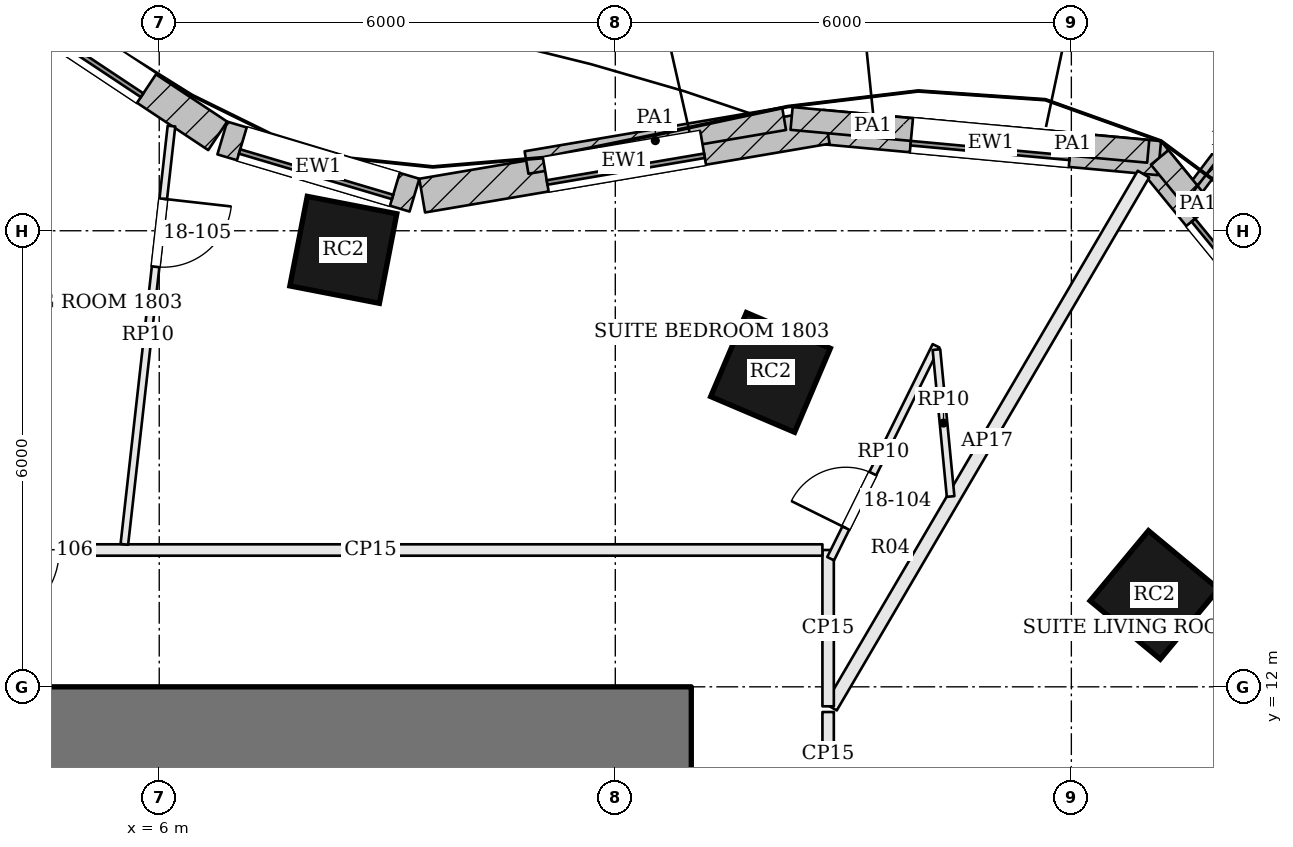
"""IFC4 building model, lengths in metres.
Left out: names, types, materials, properties, quantities, classifications, styles, units other than length and angle.
Written with IfcOpenShell. Run it as: python <this file> out.ifc"""

import sys

from ifc_helpers import new_model, si_unit, direction, frame, frame_2d, origin, origin_2d, place, context, subcontext, project, spatial, rectangle, extrude, element, fill, save


model = new_model("IFC4")
c1 = context("Model", 3, precision=1e-05, world=origin(), true_north=direction((0.0, 1.0)))
c2 = subcontext(c1, "Body", "Model", "MODEL_VIEW")
j1 = project(units=[si_unit("LENGTHUNIT", "METRE"), si_unit("PLANEANGLEUNIT", "RADIAN")], contexts=[c1])
p1 = place(None, origin())
s1 = spatial("IfcSite", under=j1, at=p1, CompositionType="ELEMENT")
p2 = place(p1, origin())
s2 = spatial("IfcBuilding", under=s1, at=p2, CompositionType="ELEMENT")
p3 = place(p2, frame((0.0, 0.0, 81.6)))
s3 = spatial("IfcBuildingStorey", under=s2, at=p3, CompositionType="ELEMENT", Elevation=81.6)
p4 = place(p3, frame((-13.0, 11.45, 0.0), z_axis=(0.0, 0.0, 1.0), x_axis=(1.0, 0.0, 0.0)))
e1 = element("IfcWall", 1, at=p4, inside=s3, PredefinedType="SHEAR", context=c2, shape_type="SweptSolid", body=[
    extrude(rectangle(XDim=26.0, YDim=1.1, at=frame_2d((13.0, 0.0))), origin(), (0.0, 0.0, 1.0), 3.6),
])
p5 = place(p4, frame((8.825, 0.0, 0.0)))
e2 = element("IfcOpeningElement", 2, at=p5, cuts=e1, PredefinedType="OPENING", context=c2, shape_type="SweptSolid", body=[
    extrude(rectangle(XDim=1.0, YDim=2.1, at=frame_2d((0.5, 1.05))), frame((0.0, 0.56, 0.0), z_axis=(0.0, -1.0, 0.0), x_axis=(1.0, 0.0, 0.0)), (0.0, 0.0, 1.0), 1.12),
])
p6 = place(p4, frame((11.275, 0.0, 0.0)))
e3 = element("IfcOpeningElement", 3, at=p6, cuts=e1, PredefinedType="OPENING", context=c2, shape_type="SweptSolid", body=[
    extrude(rectangle(XDim=1.0, YDim=2.1, at=frame_2d((0.5, 1.05))), frame((0.0, 0.56, 0.0), z_axis=(0.0, -1.0, 0.0), x_axis=(1.0, 0.0, 0.0)), (0.0, 0.0, 1.0), 1.12),
])
p7 = place(p4, frame((14.125, 0.0, 0.0)))
e4 = element("IfcOpeningElement", 4, at=p7, cuts=e1, PredefinedType="OPENING", context=c2, shape_type="SweptSolid", body=[
    extrude(rectangle(XDim=1.0, YDim=2.1, at=frame_2d((0.5, 1.05))), frame((0.0, 0.56, 0.0), z_axis=(0.0, -1.0, 0.0), x_axis=(1.0, 0.0, 0.0)), (0.0, 0.0, 1.0), 1.12),
])
p8 = place(p4, frame((16.725, 0.0, 0.0)))
e5 = element("IfcOpeningElement", 5, at=p8, cuts=e1, PredefinedType="OPENING", context=c2, shape_type="SweptSolid", body=[
    extrude(rectangle(XDim=0.7, YDim=2.1, at=frame_2d((0.35, 1.05))), frame((0.0, 0.56, 0.0), z_axis=(0.0, -1.0, 0.0), x_axis=(1.0, 0.0, 0.0)), (0.0, 0.0, 1.0), 1.12),
])
for number, where, z_axis, x_axis in (
    (6, (19.092, 13.209, -0.7), (0.0, 0.0, 1.0), (-0.769, 0.639, 0.0)),
    (7, (14.042, 16.136, -0.7), (0.0, 0.0, 1.0), (-0.92, 0.392, 0.0)),
    (8, (8.422, 17.749, -0.7), (0.0, 0.0, 1.0), (-0.982, 0.191, 0.0)),
):
    element("IfcColumn", number, at=place(p3, frame(where, z_axis=z_axis, x_axis=x_axis)), inside=s3, PredefinedType="COLUMN", context=c2, shape_type="SweptSolid", body=[
        extrude(rectangle(XDim=1.2, YDim=1.2, at=origin_2d()), origin(), (0.0, 0.0, 1.0), 4.3),
    ])
p9 = place(p3, frame((21.696, 15.748, 0.0), z_axis=(0.0, 0.0, 1.0), x_axis=(-0.632968710519, 0.774177377288, 0.0)))
e9 = element("IfcWall", 9, at=p9, inside=s3, PredefinedType="SOLIDWALL", context=c2, shape_type="SweptSolid", body=[
    extrude(rectangle(XDim=4.25, YDim=0.45, at=frame_2d((2.125, 0.0))), origin(), (0.0, 0.0, 1.0), 3.4),
])
p10 = place(p9, frame((1.075, 0.0, 0.9)))
e10 = element("IfcOpeningElement", 10, at=p10, cuts=e9, PredefinedType="OPENING", context=c2, shape_type="SweptSolid", body=[
    extrude(rectangle(XDim=2.1, YDim=2.0, at=frame_2d((1.05, 1.0))), frame((0.0, 0.235, 0.0), z_axis=(0.0, -1.0, 0.0), x_axis=(1.0, 0.0, 0.0)), (0.0, 0.0, 1.0), 0.47),
])
p11 = place(p3, frame((19.159, 18.956, 0.0), z_axis=(0.0, 0.0, 1.0), x_axis=(-0.995777399421, 0.091800712424, 0.0)))
e11 = element("IfcWall", 11, at=p11, inside=s3, PredefinedType="SOLIDWALL", context=c2, shape_type="SweptSolid", body=[
    extrude(rectangle(XDim=4.455, YDim=0.45, at=frame_2d((2.227, 0.0))), origin(), (0.0, 0.0, 1.0), 3.4),
])
p12 = place(p11, frame((1.177, 0.0, 0.9)))
e12 = element("IfcOpeningElement", 12, at=p12, cuts=e11, PredefinedType="OPENING", context=c2, shape_type="SweptSolid", body=[
    extrude(rectangle(XDim=2.1, YDim=2.0, at=frame_2d((1.05, 1.0))), frame((0.0, 0.235, 0.0), z_axis=(0.0, -1.0, 0.0), x_axis=(1.0, 0.0, 0.0)), (0.0, 0.0, 1.0), 0.47),
])
p13 = place(p3, frame((14.782, 19.367, 0.0), z_axis=(0.0, 0.0, 1.0), x_axis=(-0.98585584667, -0.167595493934, 0.0)))
e13 = element("IfcWall", 13, at=p13, inside=s3, PredefinedType="SOLIDWALL", context=c2, shape_type="SweptSolid", body=[
    extrude(rectangle(XDim=5.399, YDim=0.45, at=frame_2d((2.699, 0.0))), origin(), (0.0, 0.0, 1.0), 3.4),
])
p14 = place(p13, frame((1.649, 0.0, 0.9)))
e14 = element("IfcOpeningElement", 14, at=p14, cuts=e13, PredefinedType="OPENING", context=c2, shape_type="SweptSolid", body=[
    extrude(rectangle(XDim=2.1, YDim=2.0, at=frame_2d((1.05, 1.0))), frame((0.0, 0.235, 0.0), z_axis=(0.0, -1.0, 0.0), x_axis=(1.0, 0.0, 0.0)), (0.0, 0.0, 1.0), 0.47),
])
p15 = place(p3, frame((9.357, 18.469, 0.0), z_axis=(0.0, 0.0, 1.0), x_axis=(-0.958524054629, 0.285011643091, 0.0)))
e15 = element("IfcWall", 15, at=p15, inside=s3, PredefinedType="SOLIDWALL", context=c2, shape_type="SweptSolid", body=[
    extrude(rectangle(XDim=2.637, YDim=0.45, at=frame_2d((1.319, 0.0))), origin(), (0.0, 0.0, 1.0), 3.4),
])
p16 = place(p15, frame((0.269, 0.0, 0.9)))
e16 = element("IfcOpeningElement", 16, at=p16, cuts=e15, PredefinedType="OPENING", context=c2, shape_type="SweptSolid", body=[
    extrude(rectangle(XDim=2.1, YDim=2.0, at=frame_2d((1.05, 1.0))), frame((0.0, 0.235, 0.0), z_axis=(0.0, -1.0, 0.0), x_axis=(1.0, 0.0, 0.0)), (0.0, 0.0, 1.0), 0.47),
])
p17 = place(p3, frame((6.769, 19.248, 0.0), z_axis=(0.0, 0.0, 1.0), x_axis=(-0.832973379274, 0.553313066375, 0.0)))
e17 = element("IfcWall", 17, at=p17, inside=s3, PredefinedType="SOLIDWALL", context=c2, shape_type="SweptSolid", body=[
    extrude(rectangle(XDim=4.348, YDim=0.45, at=frame_2d((2.174, 0.0))), origin(), (0.0, 0.0, 1.0), 3.4),
])
p18 = place(p17, frame((1.124, 0.0, 0.9)))
e18 = element("IfcOpeningElement", 18, at=p18, cuts=e17, PredefinedType="OPENING", context=c2, shape_type="SweptSolid", body=[
    extrude(rectangle(XDim=2.1, YDim=2.0, at=frame_2d((1.05, 1.0))), frame((0.0, 0.235, 0.0), z_axis=(0.0, -1.0, 0.0), x_axis=(1.0, 0.0, 0.0)), (0.0, 0.0, 1.0), 0.47),
])
p19 = place(p3, frame((19.591, 18.498, 0.0), z_axis=(0.0, 0.0, 1.0), x_axis=(0.603387525063, 0.797448114048, 0.0)))
e19 = element("IfcWall", 19, at=p19, inside=s3, PredefinedType="SOLIDWALL", context=c2, shape_type="SweptSolid", body=[
    extrude(rectangle(XDim=1.75, YDim=0.2, at=frame_2d((0.875, 0.0))), origin(), (0.0, 0.0, 1.0), 3.4),
])
p20 = place(p3, frame((20.168, 17.734, 3.6), z_axis=(0.0, 0.0, 1.0), x_axis=(-0.632995189145, 0.774155727564, 0.0)))
e20 = element("IfcWall", 20, at=p20, inside=s3, PredefinedType="PARAPET", context=c2, shape_type="SweptSolid", body=[
    extrude(rectangle(XDim=1.589, YDim=0.3, at=frame_2d((0.795, 0.0))), origin(), (0.0, 0.0, 1.0), 1.1),
])
p21 = place(p3, frame((19.011, 19.045, 3.6), z_axis=(0.0, 0.0, 1.0), x_axis=(-0.995779953678, 0.09177300176, 0.0)))
e21 = element("IfcWall", 21, at=p21, inside=s3, PredefinedType="PARAPET", context=c2, shape_type="SweptSolid", body=[
    extrude(rectangle(XDim=1.992, YDim=0.3, at=frame_2d((0.996, 0.0))), origin(), (0.0, 0.0, 1.0), 1.1),
])
p22 = place(p3, frame((16.462, 19.28, 3.6), z_axis=(0.0, 0.0, 1.0), x_axis=(-0.995778015376, 0.091794030816, 0.0)))
e22 = element("IfcWall", 22, at=p22, inside=s3, PredefinedType="PARAPET", context=c2, shape_type="SweptSolid", body=[
    extrude(rectangle(XDim=2.152, YDim=0.3, at=frame_2d((1.076, 0.0))), origin(), (0.0, 0.0, 1.0), 1.1),
])
p23 = place(p3, frame((14.221, 19.473, 3.6), z_axis=(0.0, 0.0, 1.0), x_axis=(-0.985864880964, -0.167542342353, 0.0)))
e23 = element("IfcWall", 23, at=p23, inside=s3, PredefinedType="PARAPET", context=c2, shape_type="SweptSolid", body=[
    extrude(rectangle(XDim=3.438, YDim=0.3, at=frame_2d((1.719, 0.0))), origin(), (0.0, 0.0, 1.0), 1.1),
])
p24 = place(p3, frame((14.8, 10.572, 0.0), z_axis=(0.0, 0.0, 1.0), x_axis=(0.0, 1.0, 0.0)))
e24 = element("IfcWall", 24, at=p24, inside=s3, PredefinedType="PARTITIONING", context=c2, shape_type="SweptSolid", body=[
    extrude(rectangle(XDim=1.097, YDim=0.15, at=frame_2d((0.548, 0.0))), origin(), (0.0, 0.0, 1.0), 2.784),
])
p25 = place(p3, frame((18.949, 18.745, 0.0), z_axis=(0.0, 0.0, 1.0), x_axis=(-0.505754187447, -0.862677634972, 0.0)))
e25 = element("IfcWall", 25, at=p25, inside=s3, PredefinedType="PARTITIONING", context=c2, shape_type="SweptSolid", body=[
    extrude(rectangle(XDim=8.128, YDim=0.175, at=frame_2d((4.064, 0.0))), origin(), (0.0, 0.0, 1.0), 2.784),
])
p26 = place(p3, frame((14.8, 11.744, 0.0), z_axis=(0.0, 0.0, 1.0), x_axis=(0.0, 1.0, 0.0)))
e26 = element("IfcWall", 26, at=p26, inside=s3, PredefinedType="PARTITIONING", context=c2, shape_type="SweptSolid", body=[
    extrude(rectangle(XDim=2.056, YDim=0.15, at=frame_2d((1.028, 0.0))), origin(), (0.0, 0.0, 1.0), 2.784),
])
p27 = place(p3, frame((14.725, 13.8, 0.0), z_axis=(0.0, 0.0, 1.0), x_axis=(-1.0, 0.0, 0.0)))
e27 = element("IfcWall", 27, at=p27, inside=s3, PredefinedType="PARTITIONING", context=c2, shape_type="SweptSolid", body=[
    extrude(rectangle(XDim=11.889, YDim=0.15, at=frame_2d((5.945, 0.0))), origin(), (0.0, 0.0, 1.0), 2.784),
])
p28 = place(p27, frame((10.041, 0.0, 0.0)))
e28 = element("IfcOpeningElement", 28, at=p28, cuts=e27, PredefinedType="OPENING", context=c2, shape_type="SweptSolid", body=[
    extrude(rectangle(XDim=1.0, YDim=2.1, at=frame_2d((0.5, 1.05))), frame((0.0, 0.085, 0.0), z_axis=(0.0, -1.0, 0.0), x_axis=(1.0, 0.0, 0.0)), (0.0, 0.0, 1.0), 0.17),
])
p29 = place(p3, frame((22.414, 11.576, 0.0), z_axis=(0.0, 0.0, 1.0), x_axis=(-0.77113161257, -0.636675769992, 0.0)))
e29 = element("IfcWall", 29, at=p29, inside=s3, PredefinedType="PARTITIONING", context=c2, shape_type="SweptSolid", body=[
    extrude(rectangle(XDim=5.89, YDim=0.1, at=frame_2d((2.945, 0.0))), origin(), (0.0, 0.0, 1.0), 2.784),
])
p30 = place(p29, frame((1.815, 0.0, 0.0)))
e30 = element("IfcOpeningElement", 30, at=p30, cuts=e29, PredefinedType="OPENING", context=c2, shape_type="SweptSolid", body=[
    extrude(rectangle(XDim=0.9, YDim=2.4, at=frame_2d((0.45, 1.2))), frame((0.0, 0.06, 0.0), z_axis=(0.0, -1.0, 0.0), x_axis=(1.0, 0.0, 0.0)), (0.0, 0.0, 1.0), 0.12),
])
p31 = place(p3, frame((6.161, 19.377, 0.0), z_axis=(0.0, 0.0, 1.0), x_axis=(-0.11193626313, -0.993715388326, 0.0)))
e31 = element("IfcWall", 31, at=p31, inside=s3, PredefinedType="PARTITIONING", context=c2, shape_type="SweptSolid", body=[
    extrude(rectangle(XDim=5.538, YDim=0.1, at=frame_2d((2.769, 0.0))), origin(), (0.0, 0.0, 1.0), 2.784),
])
p32 = place(p31, frame((0.963, 0.0, 0.0)))
e32 = element("IfcOpeningElement", 32, at=p32, cuts=e31, PredefinedType="OPENING", context=c2, shape_type="SweptSolid", body=[
    extrude(rectangle(XDim=0.9, YDim=2.4, at=frame_2d((0.45, 1.2))), frame((0.0, 0.06, 0.0), z_axis=(0.0, -1.0, 0.0), x_axis=(1.0, 0.0, 0.0)), (0.0, 0.0, 1.0), 0.12),
])
p33 = place(p3, frame((14.833, 13.686, 0.0), z_axis=(0.0, 0.0, 1.0), x_axis=(0.443835356617, 0.896108350712, 0.0)))
e33 = element("IfcWall", 33, at=p33, inside=s3, PredefinedType="PARTITIONING", context=c2, shape_type="SweptSolid", body=[
    extrude(rectangle(XDim=3.125, YDim=0.1, at=frame_2d((1.562, 0.0))), origin(), (0.0, 0.0, 1.0), 2.784),
])
p34 = place(p33, frame((0.45, 0.0, 0.0)))
e34 = element("IfcOpeningElement", 34, at=p34, cuts=e33, PredefinedType="OPENING", context=c2, shape_type="SweptSolid", body=[
    extrude(rectangle(XDim=0.8, YDim=2.1, at=frame_2d((0.4, 1.05))), frame((0.0, 0.06, 0.0), z_axis=(0.0, -1.0, 0.0), x_axis=(1.0, 0.0, 0.0)), (0.0, 0.0, 1.0), 0.12),
])
p35 = place(p3, frame((16.225, 16.436, 0.0), z_axis=(0.0, 0.0, 1.0), x_axis=(0.095954429619, -0.995385727965, 0.0)))
e35 = element("IfcWall", 35, at=p35, inside=s3, PredefinedType="PARTITIONING", context=c2, shape_type="SweptSolid", body=[
    extrude(rectangle(XDim=1.941, YDim=0.1, at=frame_2d((0.971, 0.0))), origin(), (0.0, 0.0, 1.0), 2.784),
])
p36 = place(p10, origin())
e36 = element("IfcWindow", 36, at=p36, inside=s3, PartitioningType="SINGLE_PANEL", PredefinedType="WINDOW", context=c2, shape_type="SweptSolid", body=[
    extrude(rectangle(XDim=2.1, YDim=2.0, at=frame_2d((1.05, 1.0))), frame((0.0, 0.135, 0.0), z_axis=(0.0, -1.0, 0.0), x_axis=(1.0, 0.0, 0.0)), (0.0, 0.0, 1.0), 0.06),
])
fill(e10, e36)
p37 = place(p12, origin())
e37 = element("IfcWindow", 37, at=p37, inside=s3, PartitioningType="SINGLE_PANEL", PredefinedType="WINDOW", context=c2, shape_type="SweptSolid", body=[
    extrude(rectangle(XDim=2.1, YDim=2.0, at=frame_2d((1.05, 1.0))), frame((0.0, 0.135, 0.0), z_axis=(0.0, -1.0, 0.0), x_axis=(1.0, 0.0, 0.0)), (0.0, 0.0, 1.0), 0.06),
])
fill(e12, e37)
p38 = place(p14, origin())
e38 = element("IfcWindow", 38, at=p38, inside=s3, PartitioningType="SINGLE_PANEL", PredefinedType="WINDOW", context=c2, shape_type="SweptSolid", body=[
    extrude(rectangle(XDim=2.1, YDim=2.0, at=frame_2d((1.05, 1.0))), frame((0.0, 0.135, 0.0), z_axis=(0.0, -1.0, 0.0), x_axis=(1.0, 0.0, 0.0)), (0.0, 0.0, 1.0), 0.06),
])
fill(e14, e38)
p39 = place(p16, origin())
e39 = element("IfcWindow", 39, at=p39, inside=s3, PartitioningType="SINGLE_PANEL", PredefinedType="WINDOW", context=c2, shape_type="SweptSolid", body=[
    extrude(rectangle(XDim=2.1, YDim=2.0, at=frame_2d((1.05, 1.0))), frame((0.0, 0.135, 0.0), z_axis=(0.0, -1.0, 0.0), x_axis=(1.0, 0.0, 0.0)), (0.0, 0.0, 1.0), 0.06),
])
fill(e16, e39)
p40 = place(p18, origin())
e40 = element("IfcWindow", 40, at=p40, inside=s3, PartitioningType="SINGLE_PANEL", PredefinedType="WINDOW", context=c2, shape_type="SweptSolid", body=[
    extrude(rectangle(XDim=2.1, YDim=2.0, at=frame_2d((1.05, 1.0))), frame((0.0, 0.135, 0.0), z_axis=(0.0, -1.0, 0.0), x_axis=(1.0, 0.0, 0.0)), (0.0, 0.0, 1.0), 0.06),
])
fill(e18, e40)
p41 = place(p34, origin())
e41 = element("IfcDoor", 41, at=p41, inside=s3, OperationType="SINGLE_SWING_LEFT", PredefinedType="DOOR", context=c2, shape_type="SweptSolid", body=[
    extrude(rectangle(XDim=0.8, YDim=2.1, at=frame_2d((0.4, 1.05))), frame((0.0, 0.025, 0.0), z_axis=(0.0, -1.0, 0.0), x_axis=(1.0, 0.0, 0.0)), (0.0, 0.0, 1.0), 0.05),
])
fill(e34, e41)
p42 = place(p32, origin())
e42 = element("IfcDoor", 42, at=p42, inside=s3, OperationType="SINGLE_SWING_LEFT", PredefinedType="DOOR", context=c2, shape_type="SweptSolid", body=[
    extrude(rectangle(XDim=0.9, YDim=2.4, at=frame_2d((0.45, 1.2))), frame((0.0, 0.025, 0.0), z_axis=(0.0, -1.0, 0.0), x_axis=(1.0, 0.0, 0.0)), (0.0, 0.0, 1.0), 0.05),
])
fill(e32, e42)
p43 = place(p28, origin())
e43 = element("IfcDoor", 43, at=p43, inside=s3, OperationType="SINGLE_SWING_RIGHT", PredefinedType="DOOR", context=c2, shape_type="SweptSolid", body=[
    extrude(rectangle(XDim=1.0, YDim=2.1, at=frame_2d((0.5, 1.05))), frame((0.0, 0.025, 0.0), z_axis=(0.0, -1.0, 0.0), x_axis=(1.0, 0.0, 0.0)), (0.0, 0.0, 1.0), 0.05),
])
fill(e28, e43)
save(model, sys.argv[1])
